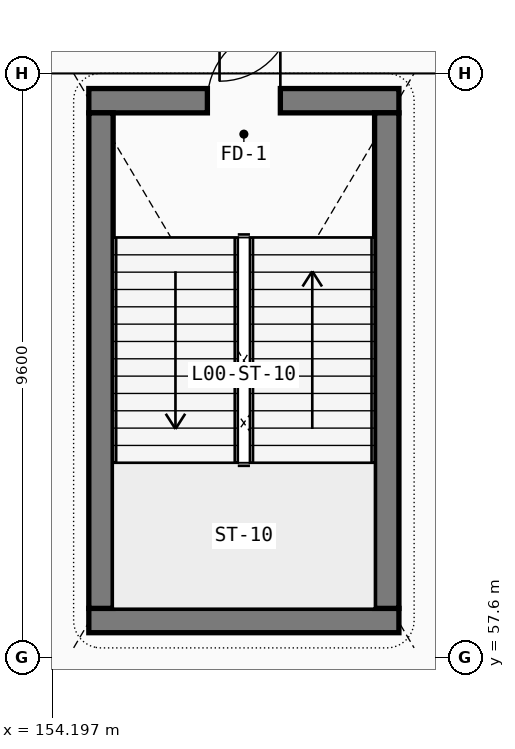
"""IFC4 building model, lengths in metres.
Left out: names, types, materials, properties, quantities, classifications, styles, units other than length and angle.
Written with IfcOpenShell. Run it as: python <this file> out.ifc"""

import sys

from ifc_helpers import new_model, si_unit, direction, frame, frame_2d, origin, place, context, subcontext, project, spatial, rectangle, extrude, element, fill, save


model = new_model("IFC4")
c1 = context("Model", 3, precision=1e-05, world=origin(), true_north=direction((0.0, 1.0)))
c2 = subcontext(c1, "Body", "Model", "MODEL_VIEW")
j1 = project(units=[si_unit("LENGTHUNIT", "METRE"), si_unit("PLANEANGLEUNIT", "RADIAN")], contexts=[c1])
p1 = place(None, origin())
s1 = spatial("IfcSite", under=j1, at=p1, CompositionType="ELEMENT")
p2 = place(p1, origin())
s2 = spatial("IfcBuilding", under=s1, at=p2, CompositionType="ELEMENT")
p3 = place(p2, origin())
s3 = spatial("IfcBuildingStorey", under=s2, at=p3, CompositionType="ELEMENT", Elevation=0.0)
p4 = place(p3, frame((154.8, 58.2, 0.0), z_axis=(0.0, 0.0, 1.0), x_axis=(1.0, 0.0, 0.0)))
e1 = element("IfcWall", 1, at=p4, inside=s3, PredefinedType="SHEAR", context=c2, shape_type="SweptSolid", body=[
    extrude(rectangle(XDim=5.1, YDim=0.4, at=frame_2d((2.55, 0.0))), origin(), (0.0, 0.0, 1.0), 4.5),
])
p5 = place(p3, frame((159.9, 66.75, 0.0), z_axis=(0.0, 0.0, 1.0), x_axis=(-1.0, 0.0, 0.0)))
e2 = element("IfcWall", 2, at=p5, inside=s3, PredefinedType="SHEAR", context=c2, shape_type="SweptSolid", body=[
    extrude(rectangle(XDim=5.1, YDim=0.4, at=frame_2d((2.55, 0.0))), origin(), (0.0, 0.0, 1.0), 4.5),
])
p6 = place(p5, frame((3.15, 0.0, 0.0), z_axis=(0.0, 0.0, 1.0), x_axis=(-1.0, 0.0, 0.0)))
e3 = element("IfcOpeningElement", 3, at=p6, cuts=e2, PredefinedType="OPENING", context=c2, shape_type="SweptSolid", body=[
    extrude(rectangle(XDim=1.2, YDim=2.2, at=frame_2d((0.6, 1.1))), frame((0.0, 0.21, 0.0), z_axis=(0.0, -1.0, 0.0), x_axis=(1.0, 0.0, 0.0)), (0.0, 0.0, 1.0), 0.42),
])
for number, where, z_axis, x_axis in (
    (4, (155.0, 66.55, 0.0), (0.0, 0.0, 1.0), (0.0, -1.0, 0.0)),
    (5, (159.7, 58.4, 0.0), (0.0, 0.0, 1.0), (0.0, 1.0, 0.0)),
):
    element("IfcWall", number, at=place(p3, frame(where, z_axis=z_axis, x_axis=x_axis)), inside=s3, PredefinedType="SHEAR", context=c2, shape_type="SweptSolid", body=[
        extrude(rectangle(XDim=8.15, YDim=0.4, at=frame_2d((4.075, 0.0))), origin(), (0.0, 0.0, 1.0), 4.5),
    ])
p7 = place(p6, origin())
e6 = element("IfcDoor", 6, at=p7, inside=s3, OperationType="SINGLE_SWING_RIGHT", PredefinedType="DOOR", context=c2, shape_type="SweptSolid", body=[
    extrude(rectangle(XDim=1.2, YDim=2.2, at=frame_2d((0.6, 1.1))), frame((0.0, 0.025, 0.0), z_axis=(0.0, -1.0, 0.0), x_axis=(1.0, 0.0, 0.0)), (0.0, 0.0, 1.0), 0.05),
])
fill(e3, e6)
save(model, sys.argv[1])
